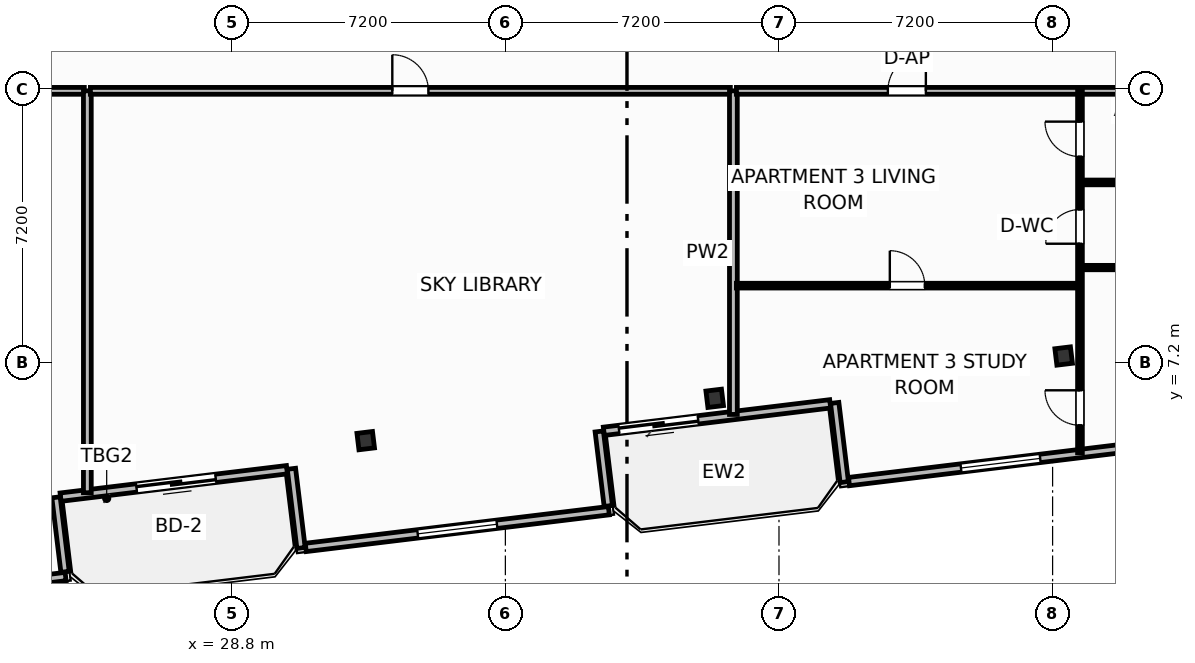
"""IFC4 building model, lengths in metres.
Left out: names, types, materials, properties, quantities, classifications, styles, units other than length and angle.
Written with IfcOpenShell. Run it as: python <this file> out.ifc"""

import sys

from ifc_helpers import new_model, si_unit, direction, frame, frame_2d, origin, origin_2d, place, context, subcontext, project, spatial, rectangle, i_section, extrude, element, fill, save


model = new_model("IFC4")
c1 = context("Model", 3, precision=1e-05, world=origin(), true_north=direction((0.0, 1.0)))
c2 = subcontext(c1, "Body", "Model", "MODEL_VIEW")
j1 = project(units=[si_unit("LENGTHUNIT", "METRE"), si_unit("PLANEANGLEUNIT", "RADIAN")], contexts=[c1])
p1 = place(None, origin())
s1 = spatial("IfcSite", under=j1, at=p1, CompositionType="ELEMENT")
p2 = place(p1, origin())
s2 = spatial("IfcBuilding", under=s1, at=p2, CompositionType="ELEMENT")
p3 = place(p2, frame((0.0, 0.0, 185.7)))
s3 = spatial("IfcBuildingStorey", under=s2, at=p3, CompositionType="ELEMENT", Elevation=185.7)
for number, where, z_axis, x_axis in (
    (1, (32.325, 5.146, 0.0), (0.0, 0.0, 1.0), (0.993, 0.12, 0.0)),
    (2, (41.508, 6.26, 0.0), (0.0, 0.0, 1.0), (0.993, 0.12, 0.0)),
    (3, (50.691, 7.373, 0.0), (0.0, 0.0, 1.0), (0.993, 0.12, 0.0)),
):
    element("IfcColumn", number, at=place(p3, frame(where, z_axis=z_axis, x_axis=x_axis)), inside=s3, PredefinedType="COLUMN", context=c2, shape_type="SweptSolid", body=[
        extrude(i_section(OverallWidth=0.412, OverallDepth=0.435, WebThickness=0.036, FlangeThickness=0.057, FilletRadius=0.025, at=origin_2d()), origin(), (0.0, 0.0, 1.0), 3.7),
    ])
p4 = place(p3, frame((30.252, 4.381, 0.0), z_axis=(0.0, 0.0, 1.0), x_axis=(-0.992735402148, -0.120318000826, 0.0)))
e4 = element("IfcWall", 4, at=p4, inside=s3, PredefinedType="SOLIDWALL", context=c2, shape_type="SweptSolid", body=[
    extrude(rectangle(XDim=6.0, YDim=0.22, at=frame_2d((3.0, 0.0))), origin(), (0.0, 0.0, 1.0), 2.73),
])
p5 = place(p4, frame((1.888, 0.0, 0.0)))
e5 = element("IfcOpeningElement", 5, at=p5, cuts=e4, PredefinedType="OPENING", context=c2, shape_type="SweptSolid", body=[
    extrude(rectangle(XDim=2.1, YDim=2.3, at=frame_2d((1.05, 1.15))), frame((0.0, 0.12, 0.0), z_axis=(0.0, -1.0, 0.0), x_axis=(1.0, 0.0, 0.0)), (0.0, 0.0, 1.0), 0.24),
])
p6 = place(p3, frame((44.548, 6.114, 0.0), z_axis=(0.0, 0.0, 1.0), x_axis=(-0.992735402148, -0.120318000826, 0.0)))
e6 = element("IfcWall", 6, at=p6, inside=s3, PredefinedType="SOLIDWALL", context=c2, shape_type="SweptSolid", body=[
    extrude(rectangle(XDim=6.0, YDim=0.22, at=frame_2d((3.0, 0.0))), origin(), (0.0, 0.0, 1.0), 2.73),
])
p7 = place(p6, frame((3.5, 0.0, 0.0)))
e7 = element("IfcOpeningElement", 7, at=p7, cuts=e6, PredefinedType="OPENING", context=c2, shape_type="SweptSolid", body=[
    extrude(rectangle(XDim=2.1, YDim=2.3, at=frame_2d((1.05, 1.15))), frame((0.0, 0.12, 0.0), z_axis=(0.0, -1.0, 0.0), x_axis=(1.0, 0.0, 0.0)), (0.0, 0.0, 1.0), 0.24),
])
p8 = place(p3, frame((11.972, 0.06, 0.0), z_axis=(0.0, 0.0, 1.0), x_axis=(0.992732021049, 0.120345894751, 0.0)))
e8 = element("IfcWall", 8, at=p8, inside=s3, PredefinedType="SOLIDWALL", context=c2, shape_type="SweptSolid", body=[
    extrude(rectangle(XDim=12.547, YDim=0.22, at=frame_2d((6.274, 0.0))), origin(), (0.0, 0.0, 1.0), 2.73),
])
p9 = place(p8, frame((5.224, 0.0, 0.8)))
e9 = element("IfcOpeningElement", 9, at=p9, cuts=e8, PredefinedType="OPENING", context=c2, shape_type="SweptSolid", body=[
    extrude(rectangle(XDim=2.1, YDim=1.75, at=frame_2d((1.05, 0.875))), frame((0.0, 0.12, 0.0), z_axis=(0.0, -1.0, 0.0), x_axis=(1.0, 0.0, 0.0)), (0.0, 0.0, 1.0), 0.24),
])
p10 = place(p3, frame((24.413, 1.694, 0.0), z_axis=(0.0, 0.0, 1.0), x_axis=(-0.120290754542, 0.992738703976, 0.0)))
e10 = element("IfcWall", 10, at=p10, inside=s3, PredefinedType="SOLIDWALL", context=c2, shape_type="SweptSolid", body=[
    extrude(rectangle(XDim=1.975, YDim=0.22, at=frame_2d((0.987, 0.0))), origin(), (0.0, 0.0, 1.0), 2.73),
])
p11 = place(p3, frame((30.37, 4.406, 0.0), z_axis=(0.0, 0.0, 1.0), x_axis=(0.120327895535, -0.992734202874, 0.0)))
e11 = element("IfcWall", 11, at=p11, inside=s3, PredefinedType="SOLIDWALL", context=c2, shape_type="SweptSolid", body=[
    extrude(rectangle(XDim=2.1, YDim=0.22, at=frame_2d((1.05, 0.0))), origin(), (0.0, 0.0, 1.0), 2.73),
])
p12 = place(p3, frame((30.747, 2.336, 0.0), z_axis=(0.0, 0.0, 1.0), x_axis=(0.992731032022, 0.120354052946, 0.0)))
e12 = element("IfcWall", 12, at=p12, inside=s3, PredefinedType="SOLIDWALL", context=c2, shape_type="SweptSolid", body=[
    extrude(rectangle(XDim=8.035, YDim=0.22, at=frame_2d((4.018, 0.0))), origin(), (0.0, 0.0, 1.0), 2.73),
])
p13 = place(p12, frame((2.968, 0.0, 0.8)))
e13 = element("IfcOpeningElement", 13, at=p13, cuts=e12, PredefinedType="OPENING", context=c2, shape_type="SweptSolid", body=[
    extrude(rectangle(XDim=2.1, YDim=1.75, at=frame_2d((1.05, 0.875))), frame((0.0, 0.12, 0.0), z_axis=(0.0, -1.0, 0.0), x_axis=(1.0, 0.0, 0.0)), (0.0, 0.0, 1.0), 0.24),
])
p14 = place(p3, frame((38.709, 3.427, 0.0), z_axis=(0.0, 0.0, 1.0), x_axis=(-0.120397815541, 0.992725725472, 0.0)))
e14 = element("IfcWall", 14, at=p14, inside=s3, PredefinedType="SOLIDWALL", context=c2, shape_type="SweptSolid", body=[
    extrude(rectangle(XDim=1.975, YDim=0.22, at=frame_2d((0.988, 0.0))), origin(), (0.0, 0.0, 1.0), 2.73),
])
p15 = place(p3, frame((44.666, 6.138, 0.0), z_axis=(0.0, 0.0, 1.0), x_axis=(0.120327895535, -0.992734202874, 0.0)))
e15 = element("IfcWall", 15, at=p15, inside=s3, PredefinedType="SOLIDWALL", context=c2, shape_type="SweptSolid", body=[
    extrude(rectangle(XDim=2.1, YDim=0.22, at=frame_2d((1.05, 0.0))), origin(), (0.0, 0.0, 1.0), 2.73),
])
p16 = place(p3, frame((45.042, 4.069, 0.0), z_axis=(0.0, 0.0, 1.0), x_axis=(0.992731032022, 0.120354052946, 0.0)))
e16 = element("IfcWall", 16, at=p16, inside=s3, PredefinedType="SOLIDWALL", context=c2, shape_type="SweptSolid", body=[
    extrude(rectangle(XDim=8.035, YDim=0.22, at=frame_2d((4.018, 0.0))), origin(), (0.0, 0.0, 1.0), 2.73),
])
p17 = place(p16, frame((2.968, 0.0, 0.8)))
e17 = element("IfcOpeningElement", 17, at=p17, cuts=e16, PredefinedType="OPENING", context=c2, shape_type="SweptSolid", body=[
    extrude(rectangle(XDim=2.1, YDim=1.75, at=frame_2d((1.05, 0.875))), frame((0.0, 0.12, 0.0), z_axis=(0.0, -1.0, 0.0), x_axis=(1.0, 0.0, 0.0)), (0.0, 0.0, 1.0), 0.24),
])
p18 = place(p3, frame((5.15, 14.35, 0.0), z_axis=(0.0, 0.0, 1.0), x_axis=(1.0, 0.0, 0.0)))
e18 = element("IfcWall", 18, at=p18, inside=s3, PredefinedType="PARTITIONING", context=c2, shape_type="SweptSolid", body=[
    extrude(rectangle(XDim=19.77, YDim=0.18, at=frame_2d((9.885, 0.0))), origin(), (0.0, 0.0, 1.0), 3.45),
])
p19 = place(p18, frame((12.575, 0.0, 0.0)))
e19 = element("IfcOpeningElement", 19, at=p19, cuts=e18, PredefinedType="OPENING", context=c2, shape_type="SweptSolid", body=[
    extrude(rectangle(XDim=0.95, YDim=2.05, at=frame_2d((0.475, 1.025))), frame((0.0, 0.1, 0.0), z_axis=(0.0, -1.0, 0.0), x_axis=(1.0, 0.0, 0.0)), (0.0, 0.0, 1.0), 0.2),
])
p20 = place(p3, frame((25.0, 3.775, 0.0), z_axis=(0.0, 0.0, 1.0), x_axis=(0.0, 1.0, 0.0)))
e20 = element("IfcWall", 20, at=p20, inside=s3, PredefinedType="PARTITIONING", context=c2, shape_type="SweptSolid", body=[
    extrude(rectangle(XDim=10.575, YDim=0.205, at=frame_2d((5.288, 0.0))), origin(), (0.0, 0.0, 1.0), 3.45),
])
p21 = place(p3, frame((25.08, 14.35, 0.0), z_axis=(0.0, 0.0, 1.0), x_axis=(1.0, 0.0, 0.0)))
e21 = element("IfcWall", 21, at=p21, inside=s3, PredefinedType="PARTITIONING", context=c2, shape_type="SweptSolid", body=[
    extrude(rectangle(XDim=16.84, YDim=0.18, at=frame_2d((8.42, 0.0))), origin(), (0.0, 0.0, 1.0), 3.45),
])
p22 = place(p21, frame((7.945, 0.0, 0.0)))
e22 = element("IfcOpeningElement", 22, at=p22, cuts=e21, PredefinedType="OPENING", context=c2, shape_type="SweptSolid", body=[
    extrude(rectangle(XDim=0.95, YDim=2.05, at=frame_2d((0.475, 1.025))), frame((0.0, 0.1, 0.0), z_axis=(0.0, -1.0, 0.0), x_axis=(1.0, 0.0, 0.0)), (0.0, 0.0, 1.0), 0.2),
])
p23 = place(p3, frame((42.0, 5.835, 0.0), z_axis=(0.0, 0.0, 1.0), x_axis=(0.0, 1.0, 0.0)))
e23 = element("IfcWall", 23, at=p23, inside=s3, PredefinedType="PARTITIONING", context=c2, shape_type="SweptSolid", body=[
    extrude(rectangle(XDim=8.515, YDim=0.205, at=frame_2d((4.257, 0.0))), origin(), (0.0, 0.0, 1.0), 2.662),
])
p24 = place(p3, frame((42.08, 9.224, 0.0), z_axis=(0.0, 0.0, 1.0), x_axis=(1.0, 0.0, 0.0)))
e24 = element("IfcWall", 24, at=p24, inside=s3, PredefinedType="PARTITIONING", context=c2, shape_type="SweptSolid", body=[
    extrude(rectangle(XDim=8.97, YDim=0.125, at=frame_2d((4.485, 0.0))), origin(), (0.0, 0.0, 1.0), 3.45),
])
p25 = place(p24, frame((4.037, 0.0, 0.0)))
e25 = element("IfcOpeningElement", 25, at=p25, cuts=e24, PredefinedType="OPENING", context=c2, shape_type="SweptSolid", body=[
    extrude(rectangle(XDim=0.92, YDim=2.05, at=frame_2d((0.46, 1.025))), frame((0.0, 0.073, 0.0), z_axis=(0.0, -1.0, 0.0), x_axis=(1.0, 0.0, 0.0)), (0.0, 0.0, 1.0), 0.145),
])
p26 = place(p3, frame((42.08, 14.35, 0.0), z_axis=(0.0, 0.0, 1.0), x_axis=(1.0, 0.0, 0.0)))
e26 = element("IfcWall", 26, at=p26, inside=s3, PredefinedType="PARTITIONING", context=c2, shape_type="SweptSolid", body=[
    extrude(rectangle(XDim=13.84, YDim=0.18, at=frame_2d((6.92, 0.0))), origin(), (0.0, 0.0, 1.0), 3.45),
])
p27 = place(p26, frame((3.985, 0.0, 0.0)))
e27 = element("IfcOpeningElement", 27, at=p27, cuts=e26, PredefinedType="OPENING", context=c2, shape_type="SweptSolid", body=[
    extrude(rectangle(XDim=1.0, YDim=2.2, at=frame_2d((0.5, 1.1))), frame((0.0, 0.1, 0.0), z_axis=(0.0, -1.0, 0.0), x_axis=(1.0, 0.0, 0.0)), (0.0, 0.0, 1.0), 0.2),
])
p28 = place(p3, frame((51.12, 4.826, 0.0), z_axis=(0.0, 0.0, 1.0), x_axis=(0.0, 1.0, 0.0)))
e28 = element("IfcWall", 28, at=p28, inside=s3, PredefinedType="PARTITIONING", context=c2, shape_type="SweptSolid", body=[
    extrude(rectangle(XDim=9.524, YDim=0.125, at=frame_2d((4.762, 0.0))), origin(), (0.0, 0.0, 1.0), 2.662),
])
p29 = place(p28, frame((0.725, 0.0, 0.0)))
e29 = element("IfcOpeningElement", 29, at=p29, cuts=e28, PredefinedType="OPENING", context=c2, shape_type="SweptSolid", body=[
    extrude(rectangle(XDim=0.92, YDim=2.05, at=frame_2d((0.46, 1.025))), frame((0.0, 0.073, 0.0), z_axis=(0.0, -1.0, 0.0), x_axis=(1.0, 0.0, 0.0)), (0.0, 0.0, 1.0), 0.145),
])
p30 = place(p28, frame((5.502, 0.0, 0.0)))
e30 = element("IfcOpeningElement", 30, at=p30, cuts=e28, PredefinedType="OPENING", context=c2, shape_type="SweptSolid", body=[
    extrude(rectangle(XDim=0.9, YDim=2.05, at=frame_2d((0.45, 1.025))), frame((0.0, 0.073, 0.0), z_axis=(0.0, -1.0, 0.0), x_axis=(1.0, 0.0, 0.0)), (0.0, 0.0, 1.0), 0.145),
])
p31 = place(p28, frame((7.794, 0.0, 0.0)))
e31 = element("IfcOpeningElement", 31, at=p31, cuts=e28, PredefinedType="OPENING", context=c2, shape_type="SweptSolid", body=[
    extrude(rectangle(XDim=0.92, YDim=2.05, at=frame_2d((0.46, 1.025))), frame((0.0, 0.073, 0.0), z_axis=(0.0, -1.0, 0.0), x_axis=(1.0, 0.0, 0.0)), (0.0, 0.0, 1.0), 0.145),
])
p32 = place(p3, frame((51.19, 11.94, 0.0), z_axis=(0.0, 0.0, 1.0), x_axis=(1.0, 0.0, 0.0)))
e32 = element("IfcWall", 32, at=p32, inside=s3, PredefinedType="PARTITIONING", context=c2, shape_type="SweptSolid", body=[
    extrude(rectangle(XDim=4.73, YDim=0.125, at=frame_2d((2.365, 0.0))), origin(), (0.0, 0.0, 1.0), 3.018),
])
p33 = place(p3, frame((51.19, 9.7, 0.0), z_axis=(0.0, 0.0, 1.0), x_axis=(1.0, 0.0, 0.0)))
e33 = element("IfcWall", 33, at=p33, inside=s3, PredefinedType="PARTITIONING", context=c2, shape_type="SweptSolid", body=[
    extrude(rectangle(XDim=4.73, YDim=0.115, at=frame_2d((2.365, 0.0))), origin(), (0.0, 0.0, 1.0), 3.45),
])
p34 = place(p5, origin())
e34 = element("IfcDoor", 34, at=p34, inside=s3, OperationType="SLIDING_TO_LEFT", PredefinedType="DOOR", context=c2, shape_type="SweptSolid", body=[
    extrude(rectangle(XDim=2.1, YDim=2.3, at=frame_2d((1.05, 1.15))), frame((0.0, 0.025, 0.0), z_axis=(0.0, -1.0, 0.0), x_axis=(1.0, 0.0, 0.0)), (0.0, 0.0, 1.0), 0.05),
])
fill(e5, e34)
p35 = place(p7, origin())
e35 = element("IfcDoor", 35, at=p35, inside=s3, OperationType="SLIDING_TO_LEFT", PredefinedType="DOOR", context=c2, shape_type="SweptSolid", body=[
    extrude(rectangle(XDim=2.1, YDim=2.3, at=frame_2d((1.05, 1.15))), frame((0.0, 0.025, 0.0), z_axis=(0.0, -1.0, 0.0), x_axis=(1.0, 0.0, 0.0)), (0.0, 0.0, 1.0), 0.05),
])
fill(e7, e35)
p36 = place(p13, origin())
e36 = element("IfcWindow", 36, at=p36, inside=s3, PartitioningType="SINGLE_PANEL", PredefinedType="WINDOW", context=c2, shape_type="SweptSolid", body=[
    extrude(rectangle(XDim=2.1, YDim=1.75, at=frame_2d((1.05, 0.875))), frame((0.0, 0.03, 0.0), z_axis=(0.0, -1.0, 0.0), x_axis=(1.0, 0.0, 0.0)), (0.0, 0.0, 1.0), 0.06),
])
fill(e13, e36)
p37 = place(p17, origin())
e37 = element("IfcWindow", 37, at=p37, inside=s3, PartitioningType="SINGLE_PANEL", PredefinedType="WINDOW", context=c2, shape_type="SweptSolid", body=[
    extrude(rectangle(XDim=2.1, YDim=1.75, at=frame_2d((1.05, 0.875))), frame((0.0, 0.03, 0.0), z_axis=(0.0, -1.0, 0.0), x_axis=(1.0, 0.0, 0.0)), (0.0, 0.0, 1.0), 0.06),
])
fill(e17, e37)
p38 = place(p22, origin())
e38 = element("IfcDoor", 38, at=p38, inside=s3, OperationType="SINGLE_SWING_LEFT", PredefinedType="DOOR", context=c2, shape_type="SweptSolid", body=[
    extrude(rectangle(XDim=0.95, YDim=2.05, at=frame_2d((0.475, 1.025))), frame((0.0, 0.025, 0.0), z_axis=(0.0, -1.0, 0.0), x_axis=(1.0, 0.0, 0.0)), (0.0, 0.0, 1.0), 0.05),
])
fill(e22, e38)
p39 = place(p25, origin())
e39 = element("IfcDoor", 39, at=p39, inside=s3, OperationType="SINGLE_SWING_LEFT", PredefinedType="DOOR", context=c2, shape_type="SweptSolid", body=[
    extrude(rectangle(XDim=0.92, YDim=2.05, at=frame_2d((0.46, 1.025))), frame((0.0, 0.025, 0.0), z_axis=(0.0, -1.0, 0.0), x_axis=(1.0, 0.0, 0.0)), (0.0, 0.0, 1.0), 0.05),
])
fill(e25, e39)
p40 = place(p27, origin())
e40 = element("IfcDoor", 40, at=p40, inside=s3, OperationType="SINGLE_SWING_RIGHT", PredefinedType="DOOR", context=c2, shape_type="SweptSolid", body=[
    extrude(rectangle(XDim=1.0, YDim=2.2, at=frame_2d((0.5, 1.1))), frame((0.0, 0.025, 0.0), z_axis=(0.0, -1.0, 0.0), x_axis=(1.0, 0.0, 0.0)), (0.0, 0.0, 1.0), 0.05),
])
fill(e27, e40)
p41 = place(p29, origin())
e41 = element("IfcDoor", 41, at=p41, inside=s3, OperationType="SINGLE_SWING_RIGHT", PredefinedType="DOOR", context=c2, shape_type="SweptSolid", body=[
    extrude(rectangle(XDim=0.92, YDim=2.05, at=frame_2d((0.46, 1.025))), frame((0.0, 0.025, 0.0), z_axis=(0.0, -1.0, 0.0), x_axis=(1.0, 0.0, 0.0)), (0.0, 0.0, 1.0), 0.05),
])
fill(e29, e41)
p42 = place(p30, origin())
e42 = element("IfcDoor", 42, at=p42, inside=s3, OperationType="SINGLE_SWING_LEFT", PredefinedType="DOOR", context=c2, shape_type="SweptSolid", body=[
    extrude(rectangle(XDim=0.9, YDim=2.05, at=frame_2d((0.45, 1.025))), frame((0.0, 0.025, 0.0), z_axis=(0.0, -1.0, 0.0), x_axis=(1.0, 0.0, 0.0)), (0.0, 0.0, 1.0), 0.05),
])
fill(e30, e42)
p43 = place(p31, origin())
e43 = element("IfcDoor", 43, at=p43, inside=s3, OperationType="SINGLE_SWING_RIGHT", PredefinedType="DOOR", context=c2, shape_type="SweptSolid", body=[
    extrude(rectangle(XDim=0.92, YDim=2.05, at=frame_2d((0.46, 1.025))), frame((0.0, 0.025, 0.0), z_axis=(0.0, -1.0, 0.0), x_axis=(1.0, 0.0, 0.0)), (0.0, 0.0, 1.0), 0.05),
])
fill(e31, e43)
save(model, sys.argv[1])
